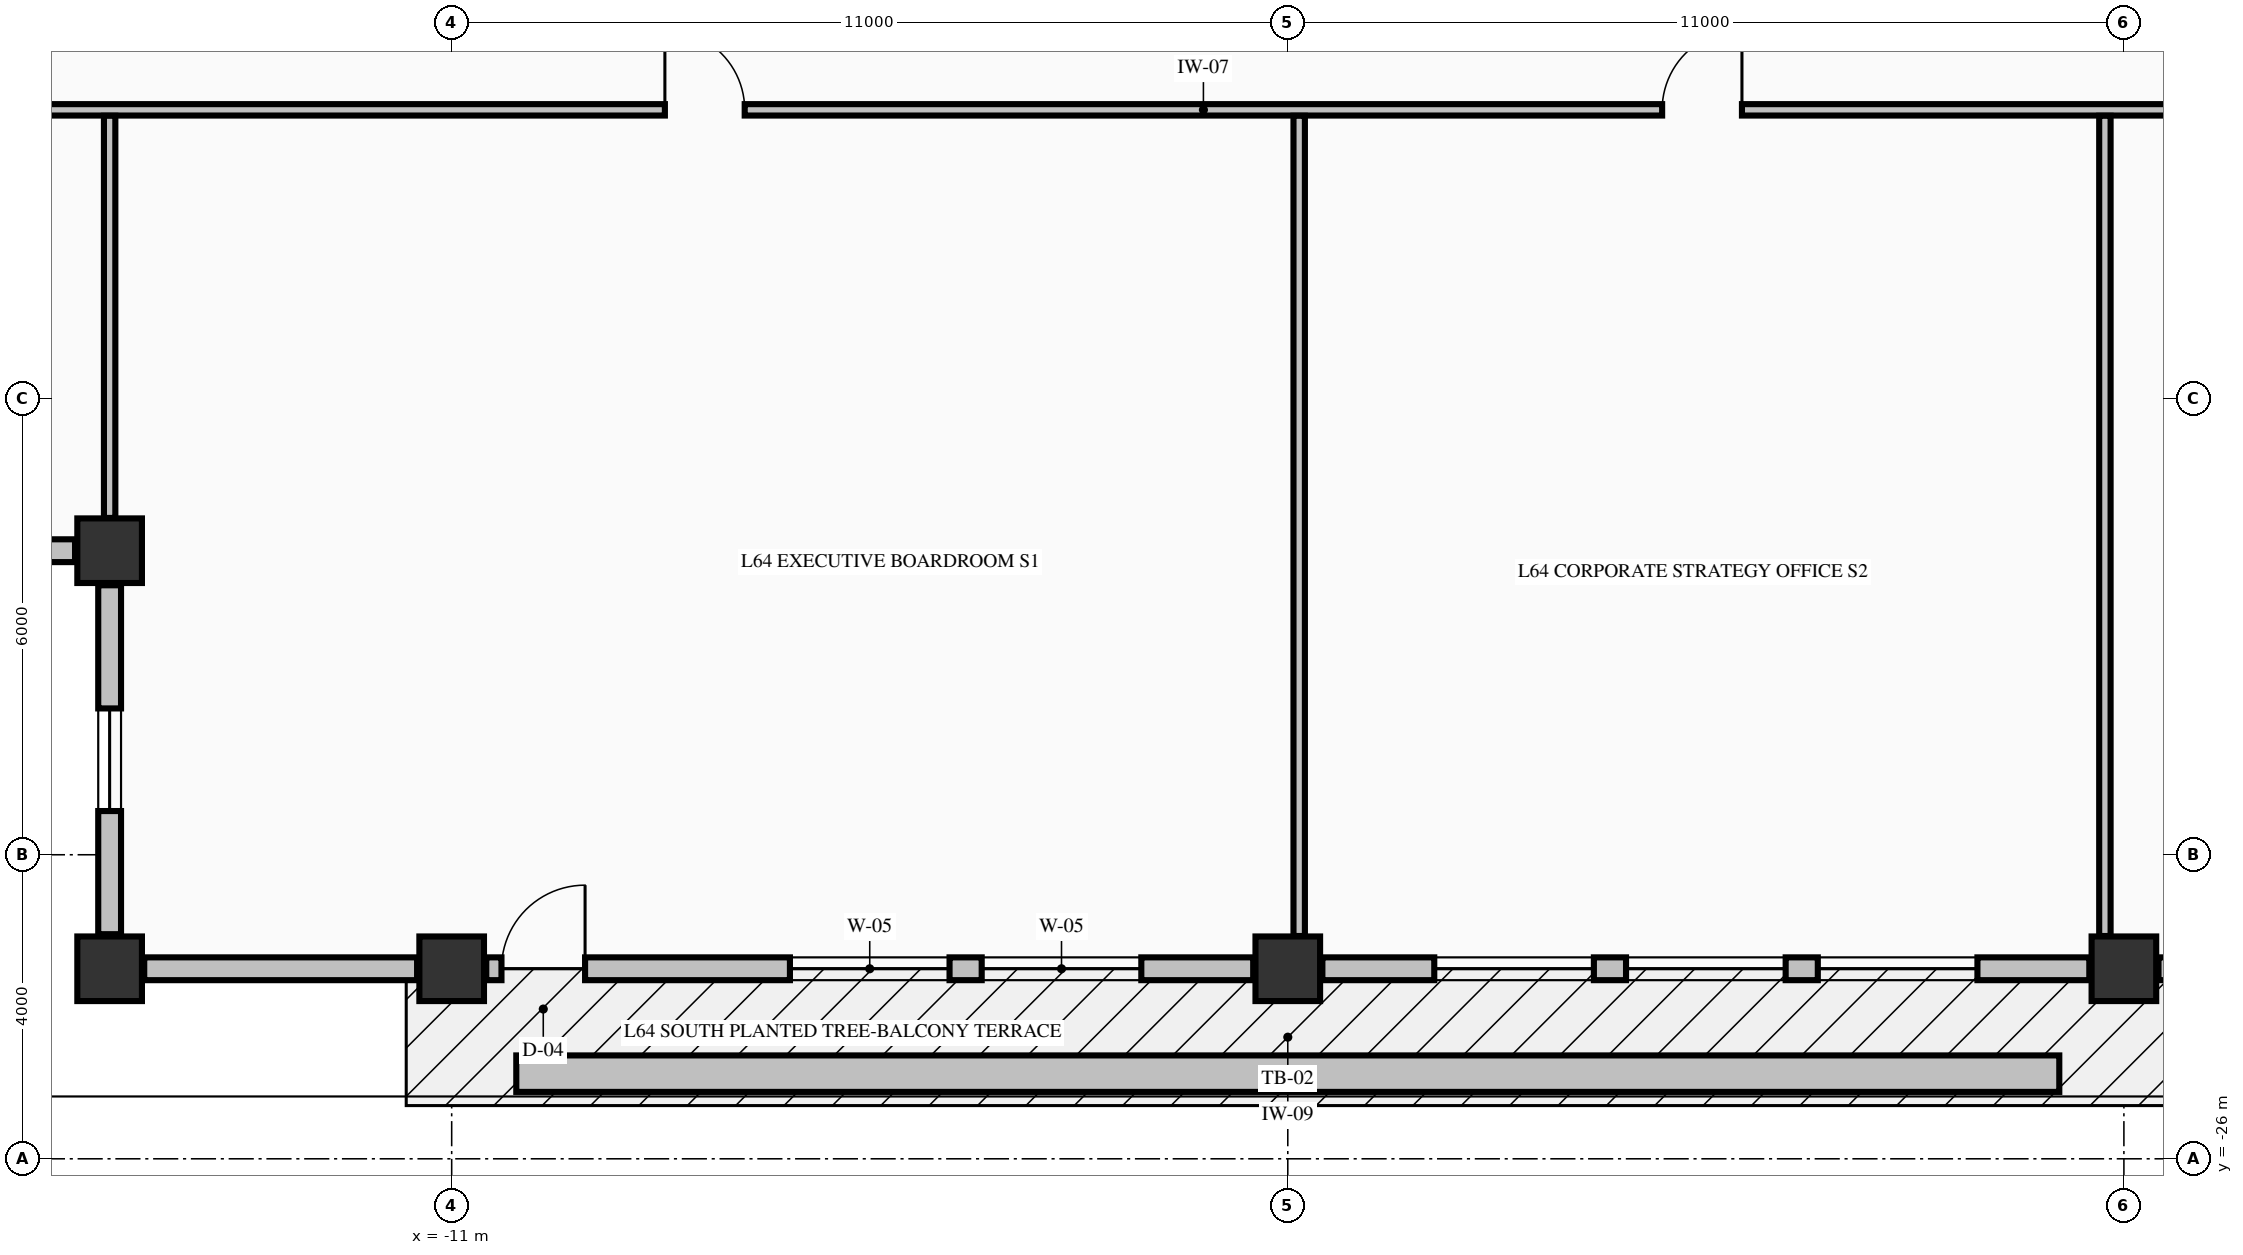
"""IFC4 building model, lengths in metres.
Left out: names, types, materials, properties, quantities, classifications, styles, units other than length and angle.
Written with IfcOpenShell. Run it as: python <this file> out.ifc"""

import sys

from ifc_helpers import new_model, si_unit, direction, frame, frame_2d, origin, origin_2d, place, context, subcontext, project, spatial, rectangle, extrude, element, fill, save


model = new_model("IFC4")
c1 = context("Model", 3, precision=1e-05, world=origin(), true_north=direction((0.0, 1.0)))
c2 = subcontext(c1, "Body", "Model", "MODEL_VIEW")
j1 = project(units=[si_unit("LENGTHUNIT", "METRE"), si_unit("PLANEANGLEUNIT", "RADIAN")], contexts=[c1])
p1 = place(None, origin())
s1 = spatial("IfcSite", under=j1, at=p1, CompositionType="ELEMENT")
p2 = place(p1, origin())
s2 = spatial("IfcBuilding", under=s1, at=p2, CompositionType="ELEMENT")
p3 = place(p2, frame((0.0, 0.0, 242.97)))
s3 = spatial("IfcBuildingStorey", under=s2, at=p3, CompositionType="ELEMENT", Elevation=242.97)
for number, where, z_axis, x_axis in (
    (1, (-15.5, -23.5, -0.25), (0.0, 0.0, 1.0), (1.0, 0.0, 0.0)),
    (2, (-11.0, -23.5, -0.25), (0.0, 0.0, 1.0), (1.0, 0.0, 0.0)),
    (3, (0.0, -23.5, -0.25), (0.0, 0.0, 1.0), (1.0, 0.0, 0.0)),
    (4, (11.0, -23.5, -0.25), (0.0, 0.0, 1.0), (1.0, 0.0, 0.0)),
    (5, (-15.5, -18.0, -0.25), (0.0, 0.0, 1.0), (1.0, 0.0, 0.0)),
):
    element("IfcColumn", number, at=place(p3, frame(where, z_axis=z_axis, x_axis=x_axis)), inside=s3, PredefinedType="COLUMN", context=c2, shape_type="SweptSolid", body=[
        extrude(rectangle(XDim=0.85, YDim=0.85, at=origin_2d()), origin(), (0.0, 0.0, 1.0), 3.23),
    ])
p4 = place(p3, frame((-20.545, -18.0, 0.0), z_axis=(0.0, 0.0, 1.0), x_axis=(1.0, 0.0, 0.0)))
e6 = element("IfcWall", 6, at=p4, inside=s3, PredefinedType="STANDARD", context=c2, shape_type="SweptSolid", body=[
    extrude(rectangle(XDim=4.59, YDim=0.3, at=frame_2d((2.295, 0.0))), origin(), (0.0, 0.0, 1.0), 2.372),
])
p5 = place(p4, frame((1.62, 0.0, 0.68)))
e7 = element("IfcOpeningElement", 7, at=p5, cuts=e6, PredefinedType="OPENING", context=c2, shape_type="SweptSolid", body=[
    extrude(rectangle(XDim=1.35, YDim=1.42, at=frame_2d((0.675, 0.71))), frame((0.0, 0.16, 0.0), z_axis=(0.0, -1.0, 0.0), x_axis=(1.0, 0.0, 0.0)), (0.0, 0.0, 1.0), 0.32),
])
p6 = place(p3, frame((-15.5, -18.455, 0.0), z_axis=(0.0, 0.0, 1.0), x_axis=(0.0, -1.0, 0.0)))
e8 = element("IfcWall", 8, at=p6, inside=s3, PredefinedType="STANDARD", context=c2, shape_type="SweptSolid", body=[
    extrude(rectangle(XDim=4.59, YDim=0.3, at=frame_2d((2.295, 0.0))), origin(), (0.0, 0.0, 1.0), 2.372),
])
p7 = place(p6, frame((1.62, 0.0, 0.68)))
e9 = element("IfcOpeningElement", 9, at=p7, cuts=e8, PredefinedType="OPENING", context=c2, shape_type="SweptSolid", body=[
    extrude(rectangle(XDim=1.35, YDim=1.42, at=frame_2d((0.675, 0.71))), frame((0.0, 0.16, 0.0), z_axis=(0.0, -1.0, 0.0), x_axis=(1.0, 0.0, 0.0)), (0.0, 0.0, 1.0), 0.32),
])
p8 = place(p3, frame((-15.045, -23.5, 0.0), z_axis=(0.0, 0.0, 1.0), x_axis=(1.0, 0.0, 0.0)))
e10 = element("IfcWall", 10, at=p8, inside=s3, PredefinedType="STANDARD", context=c2, shape_type="SweptSolid", body=[
    extrude(rectangle(XDim=3.59, YDim=0.3, at=frame_2d((1.795, 0.0))), origin(), (0.0, 0.0, 1.0), 2.372),
])
p9 = place(p3, frame((-10.545, -23.5, 0.0), z_axis=(0.0, 0.0, 1.0), x_axis=(1.0, 0.0, 0.0)))
e11 = element("IfcWall", 11, at=p9, inside=s3, PredefinedType="STANDARD", context=c2, shape_type="SweptSolid", body=[
    extrude(rectangle(XDim=10.09, YDim=0.3, at=frame_2d((5.045, 0.0))), origin(), (0.0, 0.0, 1.0), 2.372),
])
p10 = place(p9, frame((0.2, 0.0, 0.0)))
e12 = element("IfcOpeningElement", 12, at=p10, cuts=e11, PredefinedType="OPENING", context=c2, shape_type="SweptSolid", body=[
    extrude(rectangle(XDim=1.1, YDim=2.15, at=frame_2d((0.55, 1.075))), frame((0.0, 0.16, 0.0), z_axis=(0.0, -1.0, 0.0), x_axis=(1.0, 0.0, 0.0)), (0.0, 0.0, 1.0), 0.32),
])
p11 = place(p9, frame((3.995, 0.0, 0.7)))
e13 = element("IfcOpeningElement", 13, at=p11, cuts=e11, PredefinedType="OPENING", context=c2, shape_type="SweptSolid", body=[
    extrude(rectangle(XDim=2.1, YDim=1.5, at=frame_2d((1.05, 0.75))), frame((0.0, 0.16, 0.0), z_axis=(0.0, -1.0, 0.0), x_axis=(1.0, 0.0, 0.0)), (0.0, 0.0, 1.0), 0.32),
])
p12 = place(p9, frame((6.518, 0.0, 0.7)))
e14 = element("IfcOpeningElement", 14, at=p12, cuts=e11, PredefinedType="OPENING", context=c2, shape_type="SweptSolid", body=[
    extrude(rectangle(XDim=2.1, YDim=1.5, at=frame_2d((1.05, 0.75))), frame((0.0, 0.16, 0.0), z_axis=(0.0, -1.0, 0.0), x_axis=(1.0, 0.0, 0.0)), (0.0, 0.0, 1.0), 0.32),
])
p13 = place(p3, frame((0.455, -23.5, 0.0), z_axis=(0.0, 0.0, 1.0), x_axis=(1.0, 0.0, 0.0)))
e15 = element("IfcWall", 15, at=p13, inside=s3, PredefinedType="STANDARD", context=c2, shape_type="SweptSolid", body=[
    extrude(rectangle(XDim=10.09, YDim=0.3, at=frame_2d((5.045, 0.0))), origin(), (0.0, 0.0, 1.0), 2.372),
])
p14 = place(p13, frame((1.472, 0.0, 0.7)))
e16 = element("IfcOpeningElement", 16, at=p14, cuts=e15, PredefinedType="OPENING", context=c2, shape_type="SweptSolid", body=[
    extrude(rectangle(XDim=2.1, YDim=1.5, at=frame_2d((1.05, 0.75))), frame((0.0, 0.16, 0.0), z_axis=(0.0, -1.0, 0.0), x_axis=(1.0, 0.0, 0.0)), (0.0, 0.0, 1.0), 0.32),
])
p15 = place(p13, frame((3.995, 0.0, 0.7)))
e17 = element("IfcOpeningElement", 17, at=p15, cuts=e15, PredefinedType="OPENING", context=c2, shape_type="SweptSolid", body=[
    extrude(rectangle(XDim=2.1, YDim=1.5, at=frame_2d((1.05, 0.75))), frame((0.0, 0.16, 0.0), z_axis=(0.0, -1.0, 0.0), x_axis=(1.0, 0.0, 0.0)), (0.0, 0.0, 1.0), 0.32),
])
p16 = place(p13, frame((6.518, 0.0, 0.7)))
e18 = element("IfcOpeningElement", 18, at=p16, cuts=e15, PredefinedType="OPENING", context=c2, shape_type="SweptSolid", body=[
    extrude(rectangle(XDim=2.1, YDim=1.5, at=frame_2d((1.05, 0.75))), frame((0.0, 0.16, 0.0), z_axis=(0.0, -1.0, 0.0), x_axis=(1.0, 0.0, 0.0)), (0.0, 0.0, 1.0), 0.32),
])
p17 = place(p3, frame((11.455, -23.5, 0.0), z_axis=(0.0, 0.0, 1.0), x_axis=(1.0, 0.0, 0.0)))
e19 = element("IfcWall", 19, at=p17, inside=s3, PredefinedType="STANDARD", context=c2, shape_type="SweptSolid", body=[
    extrude(rectangle(XDim=8.59, YDim=0.3, at=frame_2d((4.295, 0.0))), origin(), (0.0, 0.0, 1.0), 2.372),
])
p18 = place(p3, frame((-20.075, -12.2, 0.0), z_axis=(0.0, 0.0, 1.0), x_axis=(1.0, 0.0, 0.0)))
e20 = element("IfcWall", 20, at=p18, inside=s3, PredefinedType="PARTITIONING", context=c2, shape_type="SweptSolid", body=[
    extrude(rectangle(XDim=45.91, YDim=0.15, at=frame_2d((22.955, 0.0))), origin(), (0.0, 0.0, 1.0), 2.98),
])
p19 = place(p18, frame((11.88, 0.0, 0.0)))
e21 = element("IfcOpeningElement", 21, at=p19, cuts=e20, PredefinedType="OPENING", context=c2, shape_type="SweptSolid", body=[
    extrude(rectangle(XDim=1.05, YDim=2.15, at=frame_2d((0.525, 1.075))), frame((0.0, 0.085, 0.0), z_axis=(0.0, -1.0, 0.0), x_axis=(1.0, 0.0, 0.0)), (0.0, 0.0, 1.0), 0.17),
])
p20 = place(p18, frame((25.0, 0.0, 0.0)))
e22 = element("IfcOpeningElement", 22, at=p20, cuts=e20, PredefinedType="OPENING", context=c2, shape_type="SweptSolid", body=[
    extrude(rectangle(XDim=1.05, YDim=2.15, at=frame_2d((0.525, 1.075))), frame((0.0, 0.085, 0.0), z_axis=(0.0, -1.0, 0.0), x_axis=(1.0, 0.0, 0.0)), (0.0, 0.0, 1.0), 0.17),
])
p21 = place(p18, frame((34.83, 0.0, 0.0)))
e23 = element("IfcOpeningElement", 23, at=p21, cuts=e20, PredefinedType="OPENING", context=c2, shape_type="SweptSolid", body=[
    extrude(rectangle(XDim=1.05, YDim=2.15, at=frame_2d((0.525, 1.075))), frame((0.0, 0.085, 0.0), z_axis=(0.0, -1.0, 0.0), x_axis=(1.0, 0.0, 0.0)), (0.0, 0.0, 1.0), 0.17),
])
p22 = place(p3, frame((-15.5, -17.569, 0.0), z_axis=(0.0, 0.0, 1.0), x_axis=(0.0, 1.0, 0.0)))
e24 = element("IfcWall", 24, at=p22, inside=s3, PredefinedType="PARTITIONING", context=c2, shape_type="SweptSolid", body=[
    extrude(rectangle(XDim=5.291, YDim=0.15, at=frame_2d((2.646, 0.0))), origin(), (0.0, 0.0, 1.0), 2.98),
])
for number, where, z_axis, x_axis in (
    (25, (0.15, -23.069, 0.0), (0.0, 0.0, 1.0), (0.0, 1.0, 0.0)),
    (26, (10.75, -23.069, 0.0), (0.0, 0.0, 1.0), (0.0, 1.0, 0.0)),
):
    element("IfcWall", number, at=place(p3, frame(where, z_axis=z_axis, x_axis=x_axis)), inside=s3, PredefinedType="PARTITIONING", context=c2, shape_type="SweptSolid", body=[
        extrude(rectangle(XDim=10.791, YDim=0.15, at=frame_2d((5.396, 0.0))), origin(), (0.0, 0.0, 1.0), 2.57),
    ])
p23 = place(p3, frame((-10.15, -24.88, -0.04), z_axis=(0.0, 0.0, 1.0), x_axis=(1.0, 0.0, 0.0)))
e27 = element("IfcWall", 27, at=p23, inside=s3, PredefinedType="PARAPET", context=c2, shape_type="SweptSolid", body=[
    extrude(rectangle(XDim=20.3, YDim=0.48, at=frame_2d((10.15, 0.0))), origin(), (0.0, 0.0, 1.0), 0.52),
])
p24 = place(p7, origin())
e28 = element("IfcWindow", 28, at=p24, inside=s3, PartitioningType="SINGLE_PANEL", PredefinedType="WINDOW", context=c2, shape_type="SweptSolid", body=[
    extrude(rectangle(XDim=1.35, YDim=1.42, at=frame_2d((0.675, 0.71))), frame((0.0, 0.03, 0.0), z_axis=(0.0, -1.0, 0.0), x_axis=(1.0, 0.0, 0.0)), (0.0, 0.0, 1.0), 0.06),
])
fill(e9, e28)
p25 = place(p10, origin())
e29 = element("IfcDoor", 29, at=p25, inside=s3, OperationType="SINGLE_SWING_RIGHT", PredefinedType="DOOR", context=c2, shape_type="SweptSolid", body=[
    extrude(rectangle(XDim=1.1, YDim=2.15, at=frame_2d((0.55, 1.075))), frame((0.0, 0.025, 0.0), z_axis=(0.0, -1.0, 0.0), x_axis=(1.0, 0.0, 0.0)), (0.0, 0.0, 1.0), 0.05),
])
fill(e12, e29)
p26 = place(p11, origin())
e30 = element("IfcWindow", 30, at=p26, inside=s3, PartitioningType="SINGLE_PANEL", PredefinedType="WINDOW", context=c2, shape_type="SweptSolid", body=[
    extrude(rectangle(XDim=2.1, YDim=1.5, at=frame_2d((1.05, 0.75))), frame((0.0, 0.03, 0.0), z_axis=(0.0, -1.0, 0.0), x_axis=(1.0, 0.0, 0.0)), (0.0, 0.0, 1.0), 0.06),
])
fill(e13, e30)
p27 = place(p12, origin())
e31 = element("IfcWindow", 31, at=p27, inside=s3, PartitioningType="SINGLE_PANEL", PredefinedType="WINDOW", context=c2, shape_type="SweptSolid", body=[
    extrude(rectangle(XDim=2.1, YDim=1.5, at=frame_2d((1.05, 0.75))), frame((0.0, 0.03, 0.0), z_axis=(0.0, -1.0, 0.0), x_axis=(1.0, 0.0, 0.0)), (0.0, 0.0, 1.0), 0.06),
])
fill(e14, e31)
p28 = place(p14, origin())
e32 = element("IfcWindow", 32, at=p28, inside=s3, PartitioningType="SINGLE_PANEL", PredefinedType="WINDOW", context=c2, shape_type="SweptSolid", body=[
    extrude(rectangle(XDim=2.1, YDim=1.5, at=frame_2d((1.05, 0.75))), frame((0.0, 0.03, 0.0), z_axis=(0.0, -1.0, 0.0), x_axis=(1.0, 0.0, 0.0)), (0.0, 0.0, 1.0), 0.06),
])
fill(e16, e32)
p29 = place(p15, origin())
e33 = element("IfcWindow", 33, at=p29, inside=s3, PartitioningType="SINGLE_PANEL", PredefinedType="WINDOW", context=c2, shape_type="SweptSolid", body=[
    extrude(rectangle(XDim=2.1, YDim=1.5, at=frame_2d((1.05, 0.75))), frame((0.0, 0.03, 0.0), z_axis=(0.0, -1.0, 0.0), x_axis=(1.0, 0.0, 0.0)), (0.0, 0.0, 1.0), 0.06),
])
fill(e17, e33)
p30 = place(p16, origin())
e34 = element("IfcWindow", 34, at=p30, inside=s3, PartitioningType="SINGLE_PANEL", PredefinedType="WINDOW", context=c2, shape_type="SweptSolid", body=[
    extrude(rectangle(XDim=2.1, YDim=1.5, at=frame_2d((1.05, 0.75))), frame((0.0, 0.03, 0.0), z_axis=(0.0, -1.0, 0.0), x_axis=(1.0, 0.0, 0.0)), (0.0, 0.0, 1.0), 0.06),
])
fill(e18, e34)
p31 = place(p19, origin())
e35 = element("IfcDoor", 35, at=p31, inside=s3, OperationType="SINGLE_SWING_LEFT", PredefinedType="DOOR", context=c2, shape_type="SweptSolid", body=[
    extrude(rectangle(XDim=1.05, YDim=2.15, at=frame_2d((0.525, 1.075))), frame((0.0, 0.025, 0.0), z_axis=(0.0, -1.0, 0.0), x_axis=(1.0, 0.0, 0.0)), (0.0, 0.0, 1.0), 0.05),
])
fill(e21, e35)
p32 = place(p20, origin())
e36 = element("IfcDoor", 36, at=p32, inside=s3, OperationType="SINGLE_SWING_RIGHT", PredefinedType="DOOR", context=c2, shape_type="SweptSolid", body=[
    extrude(rectangle(XDim=1.05, YDim=2.15, at=frame_2d((0.525, 1.075))), frame((0.0, 0.025, 0.0), z_axis=(0.0, -1.0, 0.0), x_axis=(1.0, 0.0, 0.0)), (0.0, 0.0, 1.0), 0.05),
])
fill(e22, e36)
save(model, sys.argv[1])
